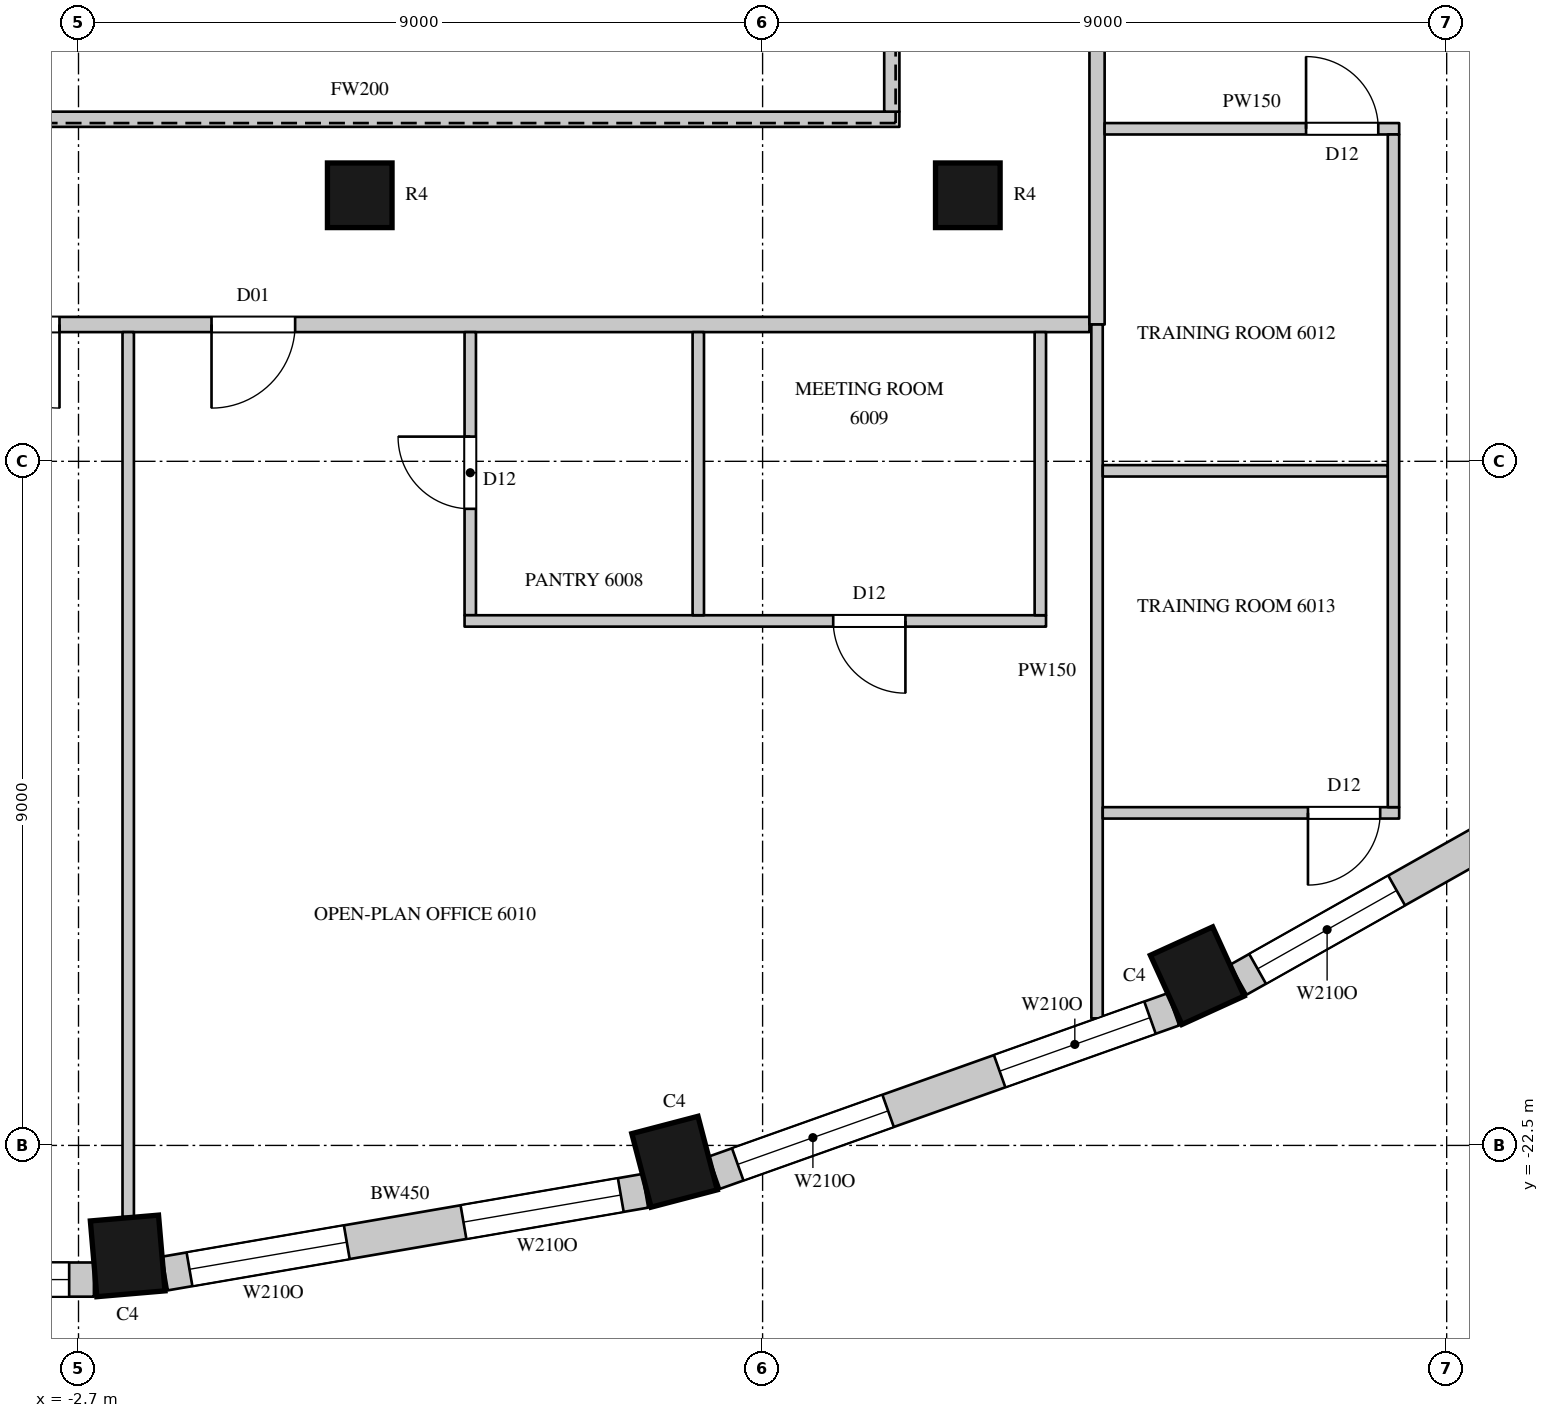
"""IFC4 building model, lengths in metres.
Left out: names, types, materials, properties, quantities, classifications, styles, units other than length and angle.
Written with IfcOpenShell. Run it as: python <this file> out.ifc"""

import sys

from ifc_helpers import new_model, si_unit, direction, frame, frame_2d, origin, origin_2d, place, context, subcontext, project, spatial, rectangle, circle, extrude, element, fill, save


model = new_model("IFC4")
c1 = context("Model", 3, precision=1e-05, world=origin(), true_north=direction((0.0, 1.0)))
c2 = subcontext(c1, "Body", "Model", "MODEL_VIEW")
j1 = project(units=[si_unit("LENGTHUNIT", "METRE"), si_unit("PLANEANGLEUNIT", "RADIAN")], contexts=[c1])
p1 = place(None, origin())
s1 = spatial("IfcSite", under=j1, at=p1, CompositionType="ELEMENT")
p2 = place(p1, origin())
s2 = spatial("IfcBuilding", under=s1, at=p2, CompositionType="ELEMENT")
p3 = place(p2, frame((0.0, 0.0, 268.0)))
s3 = spatial("IfcBuildingStorey", under=s2, at=p3, CompositionType="ELEMENT", Elevation=268.0)
for number, where, z_axis, x_axis in (
    (1, (-2.053, -23.954, 0.0), (0.0, 0.0, 1.0), (0.996, 0.085, 0.0)),
    (2, (5.142, -22.715, 0.0), (0.0, 0.0, 1.0), (0.967, 0.253, 0.0)),
    (3, (12.019, -20.267, 0.0), (0.0, 0.0, 1.0), (0.91, 0.415, 0.0)),
):
    element("IfcColumn", number, at=place(p3, frame(where, z_axis=z_axis, x_axis=x_axis)), inside=s3, PredefinedType="COLUMN", context=c2, shape_type="SweptSolid", body=[
        extrude(rectangle(XDim=0.9, YDim=1.0, at=origin_2d()), origin(), (0.0, 0.0, 1.0), 4.1),
    ])
for number, where, z_axis, x_axis in (
    (4, (1.0, -10.0, 0.0), (0.0, 0.0, 1.0), (1.0, 0.0, 0.0)),
    (5, (9.0, -10.0, 0.0), (0.0, 0.0, 1.0), (1.0, 0.0, 0.0)),
):
    element("IfcColumn", number, at=place(p3, frame(where, z_axis=z_axis, x_axis=x_axis)), inside=s3, PredefinedType="COLUMN", context=c2, shape_type="SweptSolid", body=[
        extrude(circle(Radius=0.425, at=origin_2d()), origin(), (0.0, 0.0, 1.0), 4.1),
    ])
p4 = place(p3, frame((-8.903, -24.265, 0.0), z_axis=(0.0, 0.0, 1.0), x_axis=(1.0, 0.0, 0.0)))
e6 = element("IfcWall", 6, at=p4, inside=s3, PredefinedType="SOLIDWALL", context=c2, shape_type="SweptSolid", body=[
    extrude(rectangle(XDim=6.406, YDim=0.45, at=frame_2d((3.203, 0.0))), origin(), (0.0, 0.0, 1.0), 3.8),
])
p5 = place(p4, frame((3.98, 0.0, 1.05)))
e7 = element("IfcOpeningElement", 7, at=p5, cuts=e6, PredefinedType="OPENING", context=c2, shape_type="SweptSolid", body=[
    extrude(rectangle(XDim=2.1, YDim=2.4, at=frame_2d((1.05, 1.2))), frame((0.0, 0.235, 0.0), z_axis=(0.0, -1.0, 0.0), x_axis=(1.0, 0.0, 0.0)), (0.0, 0.0, 1.0), 0.47),
])
p6 = place(p4, frame((1.214, 0.0, 1.05)))
e8 = element("IfcOpeningElement", 8, at=p6, cuts=e6, PredefinedType="OPENING", context=c2, shape_type="SweptSolid", body=[
    extrude(rectangle(XDim=1.2, YDim=2.4, at=frame_2d((0.6, 1.2))), frame((0.0, 0.235, 0.0), z_axis=(0.0, -1.0, 0.0), x_axis=(1.0, 0.0, 0.0)), (0.0, 0.0, 1.0), 0.47),
])
p7 = place(p3, frame((-1.562, -24.185, 0.0), z_axis=(0.0, 0.0, 1.0), x_axis=(0.985502073964, 0.169663379113, 0.0)))
e9 = element("IfcWall", 9, at=p7, inside=s3, PredefinedType="SOLIDWALL", context=c2, shape_type="SweptSolid", body=[
    extrude(rectangle(XDim=6.412, YDim=0.45, at=frame_2d((3.206, 0.0))), origin(), (0.0, 0.0, 1.0), 3.8),
])
p8 = place(p7, frame((0.327, 0.0, 1.05)))
e10 = element("IfcOpeningElement", 10, at=p8, cuts=e9, PredefinedType="OPENING", context=c2, shape_type="SweptSolid", body=[
    extrude(rectangle(XDim=2.1, YDim=2.4, at=frame_2d((1.05, 1.2))), frame((0.0, 0.235, 0.0), z_axis=(0.0, -1.0, 0.0), x_axis=(1.0, 0.0, 0.0)), (0.0, 0.0, 1.0), 0.47),
])
p9 = place(p7, frame((3.985, 0.0, 1.05)))
e11 = element("IfcOpeningElement", 11, at=p9, cuts=e9, PredefinedType="OPENING", context=c2, shape_type="SweptSolid", body=[
    extrude(rectangle(XDim=2.1, YDim=2.4, at=frame_2d((1.05, 1.2))), frame((0.0, 0.235, 0.0), z_axis=(0.0, -1.0, 0.0), x_axis=(1.0, 0.0, 0.0)), (0.0, 0.0, 1.0), 0.47),
])
p10 = place(p3, frame((5.665, -22.859, 0.0), z_axis=(0.0, 0.0, 1.0), x_axis=(0.942108340262, 0.335308626803, 0.0)))
e12 = element("IfcWall", 12, at=p10, inside=s3, PredefinedType="SOLIDWALL", context=c2, shape_type="SweptSolid", body=[
    extrude(rectangle(XDim=6.412, YDim=0.45, at=frame_2d((3.206, 0.0))), origin(), (0.0, 0.0, 1.0), 3.8),
])
p11 = place(p10, frame((0.327, 0.0, 1.05)))
e13 = element("IfcOpeningElement", 13, at=p11, cuts=e12, PredefinedType="OPENING", context=c2, shape_type="SweptSolid", body=[
    extrude(rectangle(XDim=2.1, YDim=2.4, at=frame_2d((1.05, 1.2))), frame((0.0, 0.235, 0.0), z_axis=(0.0, -1.0, 0.0), x_axis=(1.0, 0.0, 0.0)), (0.0, 0.0, 1.0), 0.47),
])
p12 = place(p10, frame((3.985, 0.0, 1.05)))
e14 = element("IfcOpeningElement", 14, at=p12, cuts=e12, PredefinedType="OPENING", context=c2, shape_type="SweptSolid", body=[
    extrude(rectangle(XDim=2.1, YDim=2.4, at=frame_2d((1.05, 1.2))), frame((0.0, 0.235, 0.0), z_axis=(0.0, -1.0, 0.0), x_axis=(1.0, 0.0, 0.0)), (0.0, 0.0, 1.0), 0.47),
])
p13 = place(p3, frame((12.559, -20.32, 0.0), z_axis=(0.0, 0.0, 1.0), x_axis=(0.871065783524, 0.491166367714, 0.0)))
e15 = element("IfcWall", 15, at=p13, inside=s3, PredefinedType="SOLIDWALL", context=c2, shape_type="SweptSolid", body=[
    extrude(rectangle(XDim=6.196, YDim=0.45, at=frame_2d((3.098, 0.0))), origin(), (0.0, 0.0, 1.0), 3.8),
])
p14 = place(p13, frame((0.291, 0.0, 1.05)))
e16 = element("IfcOpeningElement", 16, at=p14, cuts=e15, PredefinedType="OPENING", context=c2, shape_type="SweptSolid", body=[
    extrude(rectangle(XDim=2.1, YDim=2.4, at=frame_2d((1.05, 1.2))), frame((0.0, 0.235, 0.0), z_axis=(0.0, -1.0, 0.0), x_axis=(1.0, 0.0, 0.0)), (0.0, 0.0, 1.0), 0.47),
])
p15 = place(p13, frame((3.875, 0.0, 1.05)))
e17 = element("IfcOpeningElement", 17, at=p15, cuts=e15, PredefinedType="OPENING", context=c2, shape_type="SweptSolid", body=[
    extrude(rectangle(XDim=2.1, YDim=2.4, at=frame_2d((1.05, 1.2))), frame((0.0, 0.235, 0.0), z_axis=(0.0, -1.0, 0.0), x_axis=(1.0, 0.0, 0.0)), (0.0, 0.0, 1.0), 0.47),
])
p16 = place(p3, frame((-10.9, -11.7, 0.0), z_axis=(0.0, 0.0, 1.0), x_axis=(1.0, 0.0, 0.0)))
e18 = element("IfcWall", 18, at=p16, inside=s3, PredefinedType="PARTITIONING", context=c2, shape_type="SweptSolid", body=[
    extrude(rectangle(XDim=21.5, YDim=0.2, at=frame_2d((10.75, 0.0))), origin(), (0.0, 0.0, 1.0), 3.8),
])
p17 = place(p16, frame((0.95, 0.0, 0.0)))
e19 = element("IfcOpeningElement", 19, at=p17, cuts=e18, PredefinedType="OPENING", context=c2, shape_type="SweptSolid", body=[
    extrude(rectangle(XDim=0.95, YDim=2.2, at=frame_2d((0.475, 1.1))), frame((0.0, 0.11, 0.0), z_axis=(0.0, -1.0, 0.0), x_axis=(1.0, 0.0, 0.0)), (0.0, 0.0, 1.0), 0.22),
])
p18 = place(p16, frame((4.2, 0.0, 0.0)))
e20 = element("IfcOpeningElement", 20, at=p18, cuts=e18, PredefinedType="OPENING", context=c2, shape_type="SweptSolid", body=[
    extrude(rectangle(XDim=0.9, YDim=2.2, at=frame_2d((0.45, 1.1))), frame((0.0, 0.11, 0.0), z_axis=(0.0, -1.0, 0.0), x_axis=(1.0, 0.0, 0.0)), (0.0, 0.0, 1.0), 0.22),
])
p19 = place(p16, frame((6.85, 0.0, 0.0)))
e21 = element("IfcOpeningElement", 21, at=p19, cuts=e18, PredefinedType="OPENING", context=c2, shape_type="SweptSolid", body=[
    extrude(rectangle(XDim=1.1, YDim=2.4, at=frame_2d((0.55, 1.2))), frame((0.0, 0.11, 0.0), z_axis=(0.0, -1.0, 0.0), x_axis=(1.0, 0.0, 0.0)), (0.0, 0.0, 1.0), 0.22),
])
p20 = place(p16, frame((9.95, 0.0, 0.0)))
e22 = element("IfcOpeningElement", 22, at=p20, cuts=e18, PredefinedType="OPENING", context=c2, shape_type="SweptSolid", body=[
    extrude(rectangle(XDim=1.1, YDim=2.4, at=frame_2d((0.55, 1.2))), frame((0.0, 0.11, 0.0), z_axis=(0.0, -1.0, 0.0), x_axis=(1.0, 0.0, 0.0)), (0.0, 0.0, 1.0), 0.22),
])
p21 = place(p3, frame((-6.1, -9.0, 0.0), z_axis=(0.0, 0.0, 1.0), x_axis=(1.0, 0.0, 0.0)))
e23 = element("IfcWall", 23, at=p21, inside=s3, PredefinedType="PARTITIONING", context=c2, shape_type="SweptSolid", body=[
    extrude(rectangle(XDim=14.2, YDim=0.2, at=frame_2d((7.1, 0.0))), origin(), (0.0, 0.0, 1.0), 3.8),
])
p22 = place(p3, frame((8.0, -8.9, 0.0), z_axis=(0.0, 0.0, 1.0), x_axis=(0.0, 1.0, 0.0)))
e24 = element("IfcWall", 24, at=p22, inside=s3, PredefinedType="PARTITIONING", context=c2, shape_type="SweptSolid", body=[
    extrude(rectangle(XDim=4.38, YDim=0.2, at=frame_2d((2.19, 0.0))), origin(), (0.0, 0.0, 1.0), 3.8),
])
p23 = place(p3, frame((10.7, -11.7, 0.0), z_axis=(0.0, 0.0, 1.0), x_axis=(0.0, 1.0, 0.0)))
e25 = element("IfcWall", 25, at=p23, inside=s3, PredefinedType="PARTITIONING", context=c2, shape_type="SweptSolid", body=[
    extrude(rectangle(XDim=23.8, YDim=0.2, at=frame_2d((11.9, 0.0))), origin(), (0.0, 0.0, 1.0), 3.8),
])
p24 = place(p23, frame((12.35, 0.0, 0.0)))
e26 = element("IfcOpeningElement", 26, at=p24, cuts=e25, PredefinedType="OPENING", context=c2, shape_type="SweptSolid", body=[
    extrude(rectangle(XDim=1.5, YDim=2.4, at=frame_2d((0.75, 1.2))), frame((0.0, 0.11, 0.0), z_axis=(0.0, -1.0, 0.0), x_axis=(1.0, 0.0, 0.0)), (0.0, 0.0, 1.0), 0.22),
])
p25 = place(p23, frame((19.55, 0.0, 0.0)))
e27 = element("IfcOpeningElement", 27, at=p25, cuts=e25, PredefinedType="OPENING", context=c2, shape_type="SweptSolid", body=[
    extrude(rectangle(XDim=1.1, YDim=2.4, at=frame_2d((0.55, 1.2))), frame((0.0, 0.11, 0.0), z_axis=(0.0, -1.0, 0.0), x_axis=(1.0, 0.0, 0.0)), (0.0, 0.0, 1.0), 0.22),
])
p26 = place(p23, frame((4.25, 0.0, 0.0)))
e28 = element("IfcOpeningElement", 28, at=p26, cuts=e25, PredefinedType="OPENING", context=c2, shape_type="SweptSolid", body=[
    extrude(rectangle(XDim=1.1, YDim=2.4, at=frame_2d((0.55, 1.2))), frame((0.0, 0.11, 0.0), z_axis=(0.0, -1.0, 0.0), x_axis=(1.0, 0.0, 0.0)), (0.0, 0.0, 1.0), 0.22),
])
p27 = place(p3, frame((-2.046, -23.441, 0.0), z_axis=(0.0, 0.0, 1.0), x_axis=(0.0, 1.0, 0.0)))
e29 = element("IfcWall", 29, at=p27, inside=s3, PredefinedType="PARTITIONING", context=c2, shape_type="SweptSolid", body=[
    extrude(rectangle(XDim=11.641, YDim=0.15, at=frame_2d((5.821, 0.0))), origin(), (0.0, 0.0, 1.0), 3.8),
])
p28 = place(p3, frame((2.454, -15.525, 0.0), z_axis=(0.0, 0.0, 1.0), x_axis=(0.0, 1.0, 0.0)))
e30 = element("IfcWall", 30, at=p28, inside=s3, PredefinedType="PARTITIONING", context=c2, shape_type="SweptSolid", body=[
    extrude(rectangle(XDim=3.725, YDim=0.15, at=frame_2d((1.862, 0.0))), origin(), (0.0, 0.0, 1.0), 3.8),
])
p29 = place(p28, frame((1.4, 0.0, 0.0)))
e31 = element("IfcOpeningElement", 31, at=p29, cuts=e30, PredefinedType="OPENING", context=c2, shape_type="SweptSolid", body=[
    extrude(rectangle(XDim=0.95, YDim=2.2, at=frame_2d((0.475, 1.1))), frame((0.0, 0.085, 0.0), z_axis=(0.0, -1.0, 0.0), x_axis=(1.0, 0.0, 0.0)), (0.0, 0.0, 1.0), 0.17),
])
p30 = place(p3, frame((2.379, -15.6, 0.0), z_axis=(0.0, 0.0, 1.0), x_axis=(1.0, 0.0, 0.0)))
e32 = element("IfcWall", 32, at=p30, inside=s3, PredefinedType="PARTITIONING", context=c2, shape_type="SweptSolid", body=[
    extrude(rectangle(XDim=7.65, YDim=0.15, at=frame_2d((3.825, 0.0))), origin(), (0.0, 0.0, 1.0), 3.8),
])
p31 = place(p30, frame((4.85, 0.0, 0.0)))
e33 = element("IfcOpeningElement", 33, at=p31, cuts=e32, PredefinedType="OPENING", context=c2, shape_type="SweptSolid", body=[
    extrude(rectangle(XDim=0.95, YDim=2.2, at=frame_2d((0.475, 1.1))), frame((0.0, 0.085, 0.0), z_axis=(0.0, -1.0, 0.0), x_axis=(1.0, 0.0, 0.0)), (0.0, 0.0, 1.0), 0.17),
])
for number, where, z_axis, x_axis in (
    (34, (5.454, -15.525, 0.0), (0.0, 0.0, 1.0), (0.0, 1.0, 0.0)),
    (35, (9.954, -15.525, 0.0), (0.0, 0.0, 1.0), (0.0, 1.0, 0.0)),
):
    element("IfcWall", number, at=place(p3, frame(where, z_axis=z_axis, x_axis=x_axis)), inside=s3, PredefinedType="PARTITIONING", context=c2, shape_type="SweptSolid", body=[
        extrude(rectangle(XDim=3.725, YDim=0.15, at=frame_2d((1.862, 0.0))), origin(), (0.0, 0.0, 1.0), 3.8),
    ])
p32 = place(p3, frame((10.7, -20.828, 0.0), z_axis=(0.0, 0.0, 1.0), x_axis=(0.0, 1.0, 0.0)))
e36 = element("IfcWall", 36, at=p32, inside=s3, PredefinedType="PARTITIONING", context=c2, shape_type="SweptSolid", body=[
    extrude(rectangle(XDim=9.128, YDim=0.15, at=frame_2d((4.564, 0.0))), origin(), (0.0, 0.0, 1.0), 3.8),
])
p33 = place(p3, frame((10.775, -18.125, 0.0), z_axis=(0.0, 0.0, 1.0), x_axis=(1.0, 0.0, 0.0)))
e37 = element("IfcWall", 37, at=p33, inside=s3, PredefinedType="PARTITIONING", context=c2, shape_type="SweptSolid", body=[
    extrude(rectangle(XDim=3.9, YDim=0.15, at=frame_2d((1.95, 0.0))), origin(), (0.0, 0.0, 1.0), 3.8),
])
p34 = place(p33, frame((2.7, 0.0, 0.0)))
e38 = element("IfcOpeningElement", 38, at=p34, cuts=e37, PredefinedType="OPENING", context=c2, shape_type="SweptSolid", body=[
    extrude(rectangle(XDim=0.95, YDim=2.2, at=frame_2d((0.475, 1.1))), frame((0.0, 0.085, 0.0), z_axis=(0.0, -1.0, 0.0), x_axis=(1.0, 0.0, 0.0)), (0.0, 0.0, 1.0), 0.17),
])
p35 = place(p3, frame((10.775, -13.625, 0.0), z_axis=(0.0, 0.0, 1.0), x_axis=(1.0, 0.0, 0.0)))
e39 = element("IfcWall", 39, at=p35, inside=s3, PredefinedType="PARTITIONING", context=c2, shape_type="SweptSolid", body=[
    extrude(rectangle(XDim=3.75, YDim=0.15, at=frame_2d((1.875, 0.0))), origin(), (0.0, 0.0, 1.0), 3.8),
])
p36 = place(p3, frame((10.8, -9.125, 0.0), z_axis=(0.0, 0.0, 1.0), x_axis=(1.0, 0.0, 0.0)))
e40 = element("IfcWall", 40, at=p36, inside=s3, PredefinedType="PARTITIONING", context=c2, shape_type="SweptSolid", body=[
    extrude(rectangle(XDim=3.875, YDim=0.15, at=frame_2d((1.938, 0.0))), origin(), (0.0, 0.0, 1.0), 3.8),
])
p37 = place(p36, frame((2.65, 0.0, 0.0)))
e41 = element("IfcOpeningElement", 41, at=p37, cuts=e40, PredefinedType="OPENING", context=c2, shape_type="SweptSolid", body=[
    extrude(rectangle(XDim=0.95, YDim=2.2, at=frame_2d((0.475, 1.1))), frame((0.0, 0.085, 0.0), z_axis=(0.0, -1.0, 0.0), x_axis=(1.0, 0.0, 0.0)), (0.0, 0.0, 1.0), 0.17),
])
p38 = place(p3, frame((14.6, -18.05, 0.0), z_axis=(0.0, 0.0, 1.0), x_axis=(0.0, 1.0, 0.0)))
e42 = element("IfcWall", 42, at=p38, inside=s3, PredefinedType="PARTITIONING", context=c2, shape_type="SweptSolid", body=[
    extrude(rectangle(XDim=8.85, YDim=0.15, at=frame_2d((4.425, 0.0))), origin(), (0.0, 0.0, 1.0), 3.8),
])
p39 = place(p5, origin())
e43 = element("IfcWindow", 43, at=p39, inside=s3, PartitioningType="SINGLE_PANEL", PredefinedType="WINDOW", context=c2, shape_type="SweptSolid", body=[
    extrude(rectangle(XDim=2.1, YDim=2.4, at=frame_2d((1.05, 1.2))), frame((0.0, 0.135, 0.0), z_axis=(0.0, -1.0, 0.0), x_axis=(1.0, 0.0, 0.0)), (0.0, 0.0, 1.0), 0.06),
])
fill(e7, e43)
p40 = place(p8, origin())
e44 = element("IfcWindow", 44, at=p40, inside=s3, PartitioningType="SINGLE_PANEL", PredefinedType="WINDOW", context=c2, shape_type="SweptSolid", body=[
    extrude(rectangle(XDim=2.1, YDim=2.4, at=frame_2d((1.05, 1.2))), frame((0.0, 0.135, 0.0), z_axis=(0.0, -1.0, 0.0), x_axis=(1.0, 0.0, 0.0)), (0.0, 0.0, 1.0), 0.06),
])
fill(e10, e44)
p41 = place(p9, origin())
e45 = element("IfcWindow", 45, at=p41, inside=s3, PartitioningType="SINGLE_PANEL", PredefinedType="WINDOW", context=c2, shape_type="SweptSolid", body=[
    extrude(rectangle(XDim=2.1, YDim=2.4, at=frame_2d((1.05, 1.2))), frame((0.0, 0.135, 0.0), z_axis=(0.0, -1.0, 0.0), x_axis=(1.0, 0.0, 0.0)), (0.0, 0.0, 1.0), 0.06),
])
fill(e11, e45)
p42 = place(p11, origin())
e46 = element("IfcWindow", 46, at=p42, inside=s3, PartitioningType="SINGLE_PANEL", PredefinedType="WINDOW", context=c2, shape_type="SweptSolid", body=[
    extrude(rectangle(XDim=2.1, YDim=2.4, at=frame_2d((1.05, 1.2))), frame((0.0, 0.135, 0.0), z_axis=(0.0, -1.0, 0.0), x_axis=(1.0, 0.0, 0.0)), (0.0, 0.0, 1.0), 0.06),
])
fill(e13, e46)
p43 = place(p12, origin())
e47 = element("IfcWindow", 47, at=p43, inside=s3, PartitioningType="SINGLE_PANEL", PredefinedType="WINDOW", context=c2, shape_type="SweptSolid", body=[
    extrude(rectangle(XDim=2.1, YDim=2.4, at=frame_2d((1.05, 1.2))), frame((0.0, 0.135, 0.0), z_axis=(0.0, -1.0, 0.0), x_axis=(1.0, 0.0, 0.0)), (0.0, 0.0, 1.0), 0.06),
])
fill(e14, e47)
p44 = place(p14, origin())
e48 = element("IfcWindow", 48, at=p44, inside=s3, PartitioningType="SINGLE_PANEL", PredefinedType="WINDOW", context=c2, shape_type="SweptSolid", body=[
    extrude(rectangle(XDim=2.1, YDim=2.4, at=frame_2d((1.05, 1.2))), frame((0.0, 0.135, 0.0), z_axis=(0.0, -1.0, 0.0), x_axis=(1.0, 0.0, 0.0)), (0.0, 0.0, 1.0), 0.06),
])
fill(e16, e48)
p45 = place(p19, origin())
e49 = element("IfcDoor", 49, at=p45, inside=s3, OperationType="SINGLE_SWING_LEFT", PredefinedType="DOOR", context=c2, shape_type="SweptSolid", body=[
    extrude(rectangle(XDim=1.1, YDim=2.4, at=frame_2d((0.55, 1.2))), frame((0.0, 0.025, 0.0), z_axis=(0.0, -1.0, 0.0), x_axis=(1.0, 0.0, 0.0)), (0.0, 0.0, 1.0), 0.05),
])
fill(e21, e49)
p46 = place(p20, origin())
e50 = element("IfcDoor", 50, at=p46, inside=s3, OperationType="SINGLE_SWING_RIGHT", PredefinedType="DOOR", context=c2, shape_type="SweptSolid", body=[
    extrude(rectangle(XDim=1.1, YDim=2.4, at=frame_2d((0.55, 1.2))), frame((0.0, 0.025, 0.0), z_axis=(0.0, -1.0, 0.0), x_axis=(1.0, 0.0, 0.0)), (0.0, 0.0, 1.0), 0.05),
])
fill(e22, e50)
p47 = place(p29, origin())
e51 = element("IfcDoor", 51, at=p47, inside=s3, OperationType="SINGLE_SWING_RIGHT", PredefinedType="DOOR", context=c2, shape_type="SweptSolid", body=[
    extrude(rectangle(XDim=0.95, YDim=2.2, at=frame_2d((0.475, 1.1))), frame((0.0, 0.025, 0.0), z_axis=(0.0, -1.0, 0.0), x_axis=(1.0, 0.0, 0.0)), (0.0, 0.0, 1.0), 0.05),
])
fill(e31, e51)
p48 = place(p31, origin())
e52 = element("IfcDoor", 52, at=p48, inside=s3, OperationType="SINGLE_SWING_LEFT", PredefinedType="DOOR", context=c2, shape_type="SweptSolid", body=[
    extrude(rectangle(XDim=0.95, YDim=2.2, at=frame_2d((0.475, 1.1))), frame((0.0, 0.025, 0.0), z_axis=(0.0, -1.0, 0.0), x_axis=(1.0, 0.0, 0.0)), (0.0, 0.0, 1.0), 0.05),
])
fill(e33, e52)
p49 = place(p37, origin())
e53 = element("IfcDoor", 53, at=p49, inside=s3, OperationType="SINGLE_SWING_LEFT", PredefinedType="DOOR", context=c2, shape_type="SweptSolid", body=[
    extrude(rectangle(XDim=0.95, YDim=2.2, at=frame_2d((0.475, 1.1))), frame((0.0, 0.025, 0.0), z_axis=(0.0, -1.0, 0.0), x_axis=(1.0, 0.0, 0.0)), (0.0, 0.0, 1.0), 0.05),
])
fill(e41, e53)
p50 = place(p34, origin())
e54 = element("IfcDoor", 54, at=p50, inside=s3, OperationType="SINGLE_SWING_RIGHT", PredefinedType="DOOR", context=c2, shape_type="SweptSolid", body=[
    extrude(rectangle(XDim=0.95, YDim=2.2, at=frame_2d((0.475, 1.1))), frame((0.0, 0.025, 0.0), z_axis=(0.0, -1.0, 0.0), x_axis=(1.0, 0.0, 0.0)), (0.0, 0.0, 1.0), 0.05),
])
fill(e38, e54)
save(model, sys.argv[1])
